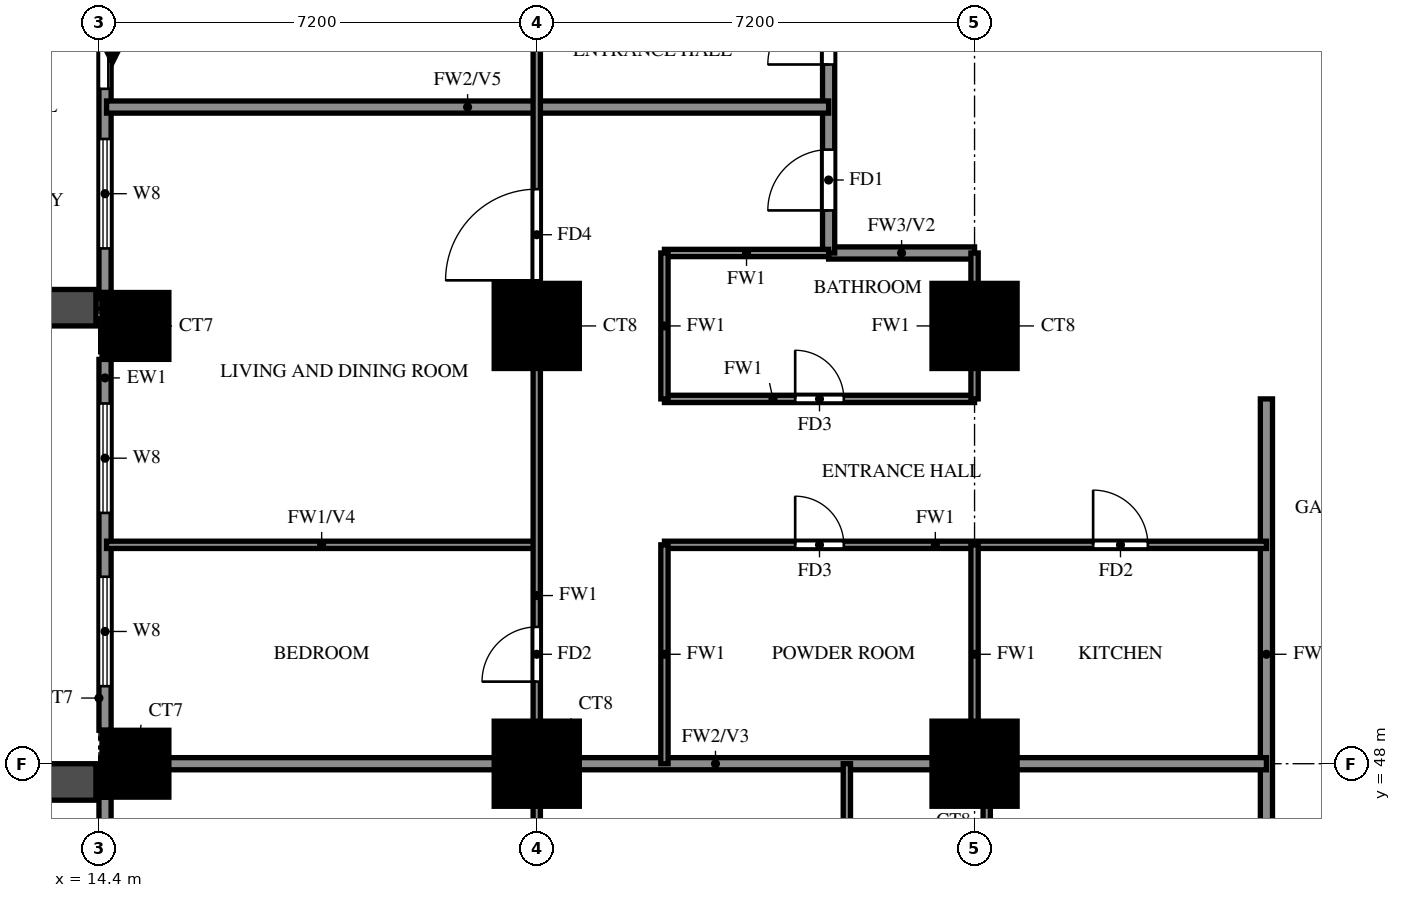
"""IFC4 building model, lengths in metres.
Left out: names, types, materials, properties, quantities, classifications, styles, units other than length and angle.
Written with IfcOpenShell. Run it as: python <this file> out.ifc"""

import sys

from ifc_helpers import new_model, si_unit, direction, frame, frame_2d, origin, origin_2d, place, context, subcontext, project, spatial, rectangle, extrude, source, transform, mapped, element, fill, save


model = new_model("IFC4")
c1 = context("Model", 3, precision=1e-05, world=origin(), true_north=direction((0.0, 1.0)))
c2 = subcontext(c1, "Body", "Model", "MODEL_VIEW")
j1 = project(units=[si_unit("LENGTHUNIT", "METRE"), si_unit("PLANEANGLEUNIT", "RADIAN")], contexts=[c1])
p1 = place(None, origin())
s1 = spatial("IfcSite", under=j1, at=p1, CompositionType="ELEMENT")
p2 = place(p1, origin())
s2 = spatial("IfcBuilding", under=s1, at=p2, CompositionType="ELEMENT")
p3 = place(p2, frame((0.0, 0.0, 48.0)))
s3 = spatial("IfcBuildingStorey", under=s2, at=p3, CompositionType="ELEMENT", Elevation=48.0)
m1 = source(origin(), c2, "Body", "SweptSolid", [
    extrude(rectangle(XDim=1.1, YDim=1.1, at=origin_2d()), origin(), (0.0, 0.0, 1.0), 3.18),
])
p4 = place(p3, frame((15.0, 48.0, 0.0), z_axis=(0.0, 0.0, 1.0), x_axis=(1.0, 0.0, 0.0)))
e1 = element("IfcColumn", 1, at=p4, inside=s3, PredefinedType="COLUMN", context=c2, shape_type="MappedRepresentation", body=[
    mapped(m1, transform((0.0, 0.0, 0.0))),
])
m2 = source(origin(), c2, "Body", "SweptSolid", [
    extrude(rectangle(XDim=1.4, YDim=1.4, at=origin_2d()), origin(), (0.0, 0.0, 1.0), 3.18),
])
for number, where, z_axis, x_axis in (
    (2, (21.6, 48.0, 0.0), (0.0, 0.0, 1.0), (1.0, 0.0, 0.0)),
    (3, (28.8, 48.0, 0.0), (0.0, 0.0, 1.0), (1.0, 0.0, 0.0)),
):
    element("IfcColumn", number, at=place(p3, frame(where, z_axis=z_axis, x_axis=x_axis)), inside=s3, PredefinedType="COLUMN", context=c2, shape_type="MappedRepresentation", body=[
        mapped(m2, transform((0.0, 0.0, 0.0))),
    ])
p5 = place(p3, frame((15.0, 55.2, 0.0), z_axis=(0.0, 0.0, 1.0), x_axis=(1.0, 0.0, 0.0)))
e4 = element("IfcColumn", 4, at=p5, inside=s3, PredefinedType="COLUMN", context=c2, shape_type="MappedRepresentation", body=[
    mapped(m1, transform((0.0, 0.0, 0.0))),
])
for number, where, z_axis, x_axis in (
    (5, (21.6, 55.2, 0.0), (0.0, 0.0, 1.0), (1.0, 0.0, 0.0)),
    (6, (28.8, 55.2, 0.0), (0.0, 0.0, 1.0), (1.0, 0.0, 0.0)),
):
    element("IfcColumn", number, at=place(p3, frame(where, z_axis=z_axis, x_axis=x_axis)), inside=s3, PredefinedType="COLUMN", context=c2, shape_type="MappedRepresentation", body=[
        mapped(m2, transform((0.0, 0.0, 0.0))),
    ])
p6 = place(p3, frame((14.5, 61.85, 0.0), z_axis=(0.0, 0.0, 1.0), x_axis=(0.0, -1.0, 0.0)))
e7 = element("IfcWall", 7, at=p6, inside=s3, PredefinedType="SOLIDWALL", context=c2, shape_type="SweptSolid", body=[
    extrude(rectangle(XDim=6.1, YDim=0.2, at=frame_2d((3.05, 0.0))), origin(), (0.0, 0.0, 1.0), 3.18),
])
p7 = place(p6, frame((0.95, 0.0, 0.0)))
e8 = element("IfcOpeningElement", 8, at=p7, cuts=e7, PredefinedType="OPENING", context=c2, shape_type="SweptSolid", body=[
    extrude(rectangle(XDim=1.8, YDim=2.4, at=frame_2d((0.9, 1.2))), frame((0.0, 0.11, 0.0), z_axis=(0.0, -1.0, 0.0), x_axis=(1.0, 0.0, 0.0)), (0.0, 0.0, 1.0), 0.22),
])
p8 = place(p6, frame((3.575, 0.0, 0.6)))
e9 = element("IfcOpeningElement", 9, at=p8, cuts=e7, PredefinedType="OPENING", context=c2, shape_type="SweptSolid", body=[
    extrude(rectangle(XDim=1.8, YDim=2.4, at=frame_2d((0.9, 1.2))), frame((0.0, 0.11, 0.0), z_axis=(0.0, -1.0, 0.0), x_axis=(1.0, 0.0, 0.0)), (0.0, 0.0, 1.0), 0.22),
])
p9 = place(p3, frame((14.5, 54.65, 0.0), z_axis=(0.0, 0.0, 1.0), x_axis=(0.0, -1.0, 0.0)))
e10 = element("IfcWall", 10, at=p9, inside=s3, PredefinedType="SOLIDWALL", context=c2, shape_type="SweptSolid", body=[
    extrude(rectangle(XDim=6.1, YDim=0.2, at=frame_2d((3.05, 0.0))), origin(), (0.0, 0.0, 1.0), 3.18),
])
p10 = place(p9, frame((3.575, 0.0, 0.6)))
e11 = element("IfcOpeningElement", 11, at=p10, cuts=e10, PredefinedType="OPENING", context=c2, shape_type="SweptSolid", body=[
    extrude(rectangle(XDim=1.8, YDim=2.4, at=frame_2d((0.9, 1.2))), frame((0.0, 0.11, 0.0), z_axis=(0.0, -1.0, 0.0), x_axis=(1.0, 0.0, 0.0)), (0.0, 0.0, 1.0), 0.22),
])
p11 = place(p9, frame((0.725, 0.0, 0.6)))
e12 = element("IfcOpeningElement", 12, at=p11, cuts=e10, PredefinedType="OPENING", context=c2, shape_type="SweptSolid", body=[
    extrude(rectangle(XDim=1.8, YDim=2.4, at=frame_2d((0.9, 1.2))), frame((0.0, 0.11, 0.0), z_axis=(0.0, -1.0, 0.0), x_axis=(1.0, 0.0, 0.0)), (0.0, 0.0, 1.0), 0.22),
])
p12 = place(p3, frame((14.5, 47.45, 0.0), z_axis=(0.0, 0.0, 1.0), x_axis=(0.0, -1.0, 0.0)))
e13 = element("IfcWall", 13, at=p12, inside=s3, PredefinedType="SOLIDWALL", context=c2, shape_type="SweptSolid", body=[
    extrude(rectangle(XDim=6.1, YDim=0.2, at=frame_2d((3.05, 0.0))), origin(), (0.0, 0.0, 1.0), 3.18),
])
p13 = place(p12, frame((2.15, 0.0, 0.0)))
e14 = element("IfcOpeningElement", 14, at=p13, cuts=e13, PredefinedType="OPENING", context=c2, shape_type="SweptSolid", body=[
    extrude(rectangle(XDim=1.8, YDim=2.4, at=frame_2d((0.9, 1.2))), frame((0.0, 0.11, 0.0), z_axis=(0.0, -1.0, 0.0), x_axis=(1.0, 0.0, 0.0)), (0.0, 0.0, 1.0), 0.22),
])
p14 = place(p12, frame((0.425, 0.0, 0.6)))
e15 = element("IfcOpeningElement", 15, at=p14, cuts=e13, PredefinedType="OPENING", context=c2, shape_type="SweptSolid", body=[
    extrude(rectangle(XDim=1.2, YDim=2.4, at=frame_2d((0.6, 1.2))), frame((0.0, 0.11, 0.0), z_axis=(0.0, -1.0, 0.0), x_axis=(1.0, 0.0, 0.0)), (0.0, 0.0, 1.0), 0.22),
])
p15 = place(p12, frame((4.475, 0.0, 0.6)))
e16 = element("IfcOpeningElement", 16, at=p15, cuts=e13, PredefinedType="OPENING", context=c2, shape_type="SweptSolid", body=[
    extrude(rectangle(XDim=1.2, YDim=2.4, at=frame_2d((0.6, 1.2))), frame((0.0, 0.11, 0.0), z_axis=(0.0, -1.0, 0.0), x_axis=(1.0, 0.0, 0.0)), (0.0, 0.0, 1.0), 0.22),
])
for number, where, z_axis, x_axis in (
    (17, (14.35, 55.5, 0.0), (0.0, 0.0, 1.0), (-1.0, 0.0, 0.0)),
    (18, (14.35, 47.7, 0.0), (0.0, 0.0, 1.0), (-1.0, 0.0, 0.0)),
):
    element("IfcWall", number, at=place(p3, frame(where, z_axis=z_axis, x_axis=x_axis)), inside=s3, PredefinedType="SOLIDWALL", context=c2, shape_type="SweptSolid", body=[
        extrude(rectangle(XDim=2.65, YDim=0.6, at=frame_2d((1.325, 0.0))), origin(), (0.0, 0.0, 1.0), 2.85),
    ])
p16 = place(p3, frame((26.4, 56.4, 0.0), z_axis=(0.0, 0.0, 1.0), x_axis=(1.0, 0.0, 0.0)))
e19 = element("IfcWall", 19, at=p16, inside=s3, PredefinedType="SOLIDWALL", context=c2, shape_type="SweptSolid", body=[
    extrude(rectangle(XDim=2.4, YDim=0.2, at=frame_2d((1.2, 0.0))), origin(), (0.0, 0.0, 1.0), 3.18),
])
p17 = place(p3, frame((26.4, 56.4, 0.0), z_axis=(0.0, 0.0, 1.0), x_axis=(0.0, 1.0, 0.0)))
e20 = element("IfcWall", 20, at=p17, inside=s3, PredefinedType="SOLIDWALL", context=c2, shape_type="SweptSolid", body=[
    extrude(rectangle(XDim=9.6, YDim=0.2, at=frame_2d((4.8, 0.0))), origin(), (0.0, 0.0, 1.0), 3.18),
])
p18 = place(p17, frame((0.7, 0.0, 0.0)))
e21 = element("IfcOpeningElement", 21, at=p18, cuts=e20, PredefinedType="OPENING", context=c2, shape_type="SweptSolid", body=[
    extrude(rectangle(XDim=1.0, YDim=2.1, at=frame_2d((0.5, 1.05))), frame((0.0, 0.11, 0.0), z_axis=(0.0, -1.0, 0.0), x_axis=(1.0, 0.0, 0.0)), (0.0, 0.0, 1.0), 0.22),
])
p19 = place(p17, frame((3.1, 0.0, 0.0)))
e22 = element("IfcOpeningElement", 22, at=p19, cuts=e20, PredefinedType="OPENING", context=c2, shape_type="SweptSolid", body=[
    extrude(rectangle(XDim=1.0, YDim=2.1, at=frame_2d((0.5, 1.05))), frame((0.0, 0.11, 0.0), z_axis=(0.0, -1.0, 0.0), x_axis=(1.0, 0.0, 0.0)), (0.0, 0.0, 1.0), 0.22),
])
p20 = place(p3, frame((33.6, 45.6, 0.0), z_axis=(0.0, 0.0, 1.0), x_axis=(0.0, 1.0, 0.0)))
e23 = element("IfcWall", 23, at=p20, inside=s3, PredefinedType="SOLIDWALL", context=c2, shape_type="SweptSolid", body=[
    extrude(rectangle(XDim=8.4, YDim=0.2, at=frame_2d((4.2, 0.0))), origin(), (0.0, 0.0, 1.0), 3.18),
])
p21 = place(p3, frame((14.525, 48.0, 0.0), z_axis=(0.0, 0.0, 1.0), x_axis=(1.0, 0.0, 0.0)))
e24 = element("IfcWall", 24, at=p21, inside=s3, PredefinedType="SOLIDWALL", context=c2, shape_type="SweptSolid", body=[
    extrude(rectangle(XDim=19.075, YDim=0.2, at=frame_2d((9.538, 0.0))), origin(), (0.0, 0.0, 1.0), 3.18),
])
p22 = place(p3, frame((14.525, 58.8, 0.0), z_axis=(0.0, 0.0, 1.0), x_axis=(1.0, 0.0, 0.0)))
e25 = element("IfcWall", 25, at=p22, inside=s3, PredefinedType="SOLIDWALL", context=c2, shape_type="SweptSolid", body=[
    extrude(rectangle(XDim=11.875, YDim=0.2, at=frame_2d((5.938, 0.0))), origin(), (0.0, 0.0, 1.0), 2.28),
])
p23 = place(p3, frame((14.525, 51.6, 0.0), z_axis=(0.0, 0.0, 1.0), x_axis=(1.0, 0.0, 0.0)))
e26 = element("IfcWall", 26, at=p23, inside=s3, PredefinedType="PARTITIONING", context=c2, shape_type="SweptSolid", body=[
    extrude(rectangle(XDim=7.075, YDim=0.12, at=frame_2d((3.538, 0.0))), origin(), (0.0, 0.0, 1.0), 2.28),
])
p24 = place(p3, frame((23.7, 51.6, 0.0), z_axis=(0.0, 0.0, 1.0), x_axis=(1.0, 0.0, 0.0)))
e27 = element("IfcWall", 27, at=p24, inside=s3, PredefinedType="PARTITIONING", context=c2, shape_type="SweptSolid", body=[
    extrude(rectangle(XDim=9.9, YDim=0.12, at=frame_2d((4.95, 0.0))), origin(), (0.0, 0.0, 1.0), 3.18),
])
p25 = place(p24, frame((2.15, 0.0, 0.0)))
e28 = element("IfcOpeningElement", 28, at=p25, cuts=e27, PredefinedType="OPENING", context=c2, shape_type="SweptSolid", body=[
    extrude(rectangle(XDim=0.8, YDim=2.1, at=frame_2d((0.4, 1.05))), frame((0.0, 0.07, 0.0), z_axis=(0.0, -1.0, 0.0), x_axis=(1.0, 0.0, 0.0)), (0.0, 0.0, 1.0), 0.14),
])
p26 = place(p24, frame((7.05, 0.0, 0.0)))
e29 = element("IfcOpeningElement", 29, at=p26, cuts=e27, PredefinedType="OPENING", context=c2, shape_type="SweptSolid", body=[
    extrude(rectangle(XDim=0.9, YDim=2.1, at=frame_2d((0.45, 1.05))), frame((0.0, 0.07, 0.0), z_axis=(0.0, -1.0, 0.0), x_axis=(1.0, 0.0, 0.0)), (0.0, 0.0, 1.0), 0.14),
])
p27 = place(p3, frame((23.7, 54.0, 0.0), z_axis=(0.0, 0.0, 1.0), x_axis=(1.0, 0.0, 0.0)))
e30 = element("IfcWall", 30, at=p27, inside=s3, PredefinedType="PARTITIONING", context=c2, shape_type="SweptSolid", body=[
    extrude(rectangle(XDim=5.1, YDim=0.12, at=frame_2d((2.55, 0.0))), origin(), (0.0, 0.0, 1.0), 3.18),
])
p28 = place(p27, frame((2.15, 0.0, 0.0)))
e31 = element("IfcOpeningElement", 31, at=p28, cuts=e30, PredefinedType="OPENING", context=c2, shape_type="SweptSolid", body=[
    extrude(rectangle(XDim=0.8, YDim=2.1, at=frame_2d((0.4, 1.05))), frame((0.0, 0.07, 0.0), z_axis=(0.0, -1.0, 0.0), x_axis=(1.0, 0.0, 0.0)), (0.0, 0.0, 1.0), 0.14),
])
p29 = place(p3, frame((23.7, 56.4, 0.0), z_axis=(0.0, 0.0, 1.0), x_axis=(1.0, 0.0, 0.0)))
e32 = element("IfcWall", 32, at=p29, inside=s3, PredefinedType="PARTITIONING", context=c2, shape_type="SweptSolid", body=[
    extrude(rectangle(XDim=2.7, YDim=0.12, at=frame_2d((1.35, 0.0))), origin(), (0.0, 0.0, 1.0), 3.18),
])
p30 = place(p3, frame((21.6, 33.725, 0.0), z_axis=(0.0, 0.0, 1.0), x_axis=(0.0, 1.0, 0.0)))
e33 = element("IfcWall", 33, at=p30, inside=s3, PredefinedType="PARTITIONING", context=c2, shape_type="SweptSolid", body=[
    extrude(rectangle(XDim=35.875, YDim=0.12, at=frame_2d((17.938, 0.0))), origin(), (0.0, 0.0, 1.0), 3.18),
])
p31 = place(p30, frame((7.775, 0.0, 0.0)))
e34 = element("IfcOpeningElement", 34, at=p31, cuts=e33, PredefinedType="OPENING", context=c2, shape_type="SweptSolid", body=[
    extrude(rectangle(XDim=0.9, YDim=2.1, at=frame_2d((0.45, 1.05))), frame((0.0, 0.07, 0.0), z_axis=(0.0, -1.0, 0.0), x_axis=(1.0, 0.0, 0.0)), (0.0, 0.0, 1.0), 0.14),
])
p32 = place(p30, frame((15.625, 0.0, 0.0)))
e35 = element("IfcOpeningElement", 35, at=p32, cuts=e33, PredefinedType="OPENING", context=c2, shape_type="SweptSolid", body=[
    extrude(rectangle(XDim=0.9, YDim=2.1, at=frame_2d((0.45, 1.05))), frame((0.0, 0.07, 0.0), z_axis=(0.0, -1.0, 0.0), x_axis=(1.0, 0.0, 0.0)), (0.0, 0.0, 1.0), 0.14),
])
p33 = place(p30, frame((22.225, 0.0, 0.0)))
e36 = element("IfcOpeningElement", 36, at=p33, cuts=e33, PredefinedType="OPENING", context=c2, shape_type="SweptSolid", body=[
    extrude(rectangle(XDim=1.5, YDim=2.1, at=frame_2d((0.75, 1.05))), frame((0.0, 0.07, 0.0), z_axis=(0.0, -1.0, 0.0), x_axis=(1.0, 0.0, 0.0)), (0.0, 0.0, 1.0), 0.14),
])
p34 = place(p30, frame((26.425, 0.0, 0.0)))
e37 = element("IfcOpeningElement", 37, at=p34, cuts=e33, PredefinedType="OPENING", context=c2, shape_type="SweptSolid", body=[
    extrude(rectangle(XDim=0.9, YDim=2.1, at=frame_2d((0.45, 1.05))), frame((0.0, 0.07, 0.0), z_axis=(0.0, -1.0, 0.0), x_axis=(1.0, 0.0, 0.0)), (0.0, 0.0, 1.0), 0.14),
])
p35 = place(p30, frame((31.825, 0.0, 0.0)))
e38 = element("IfcOpeningElement", 38, at=p35, cuts=e33, PredefinedType="OPENING", context=c2, shape_type="SweptSolid", body=[
    extrude(rectangle(XDim=0.9, YDim=2.1, at=frame_2d((0.45, 1.05))), frame((0.0, 0.07, 0.0), z_axis=(0.0, -1.0, 0.0), x_axis=(1.0, 0.0, 0.0)), (0.0, 0.0, 1.0), 0.14),
])
p36 = place(p3, frame((23.7, 48.0, 0.0), z_axis=(0.0, 0.0, 1.0), x_axis=(0.0, 1.0, 0.0)))
e39 = element("IfcWall", 39, at=p36, inside=s3, PredefinedType="PARTITIONING", context=c2, shape_type="SweptSolid", body=[
    extrude(rectangle(XDim=3.6, YDim=0.12, at=frame_2d((1.8, 0.0))), origin(), (0.0, 0.0, 1.0), 3.18),
])
p37 = place(p3, frame((23.7, 54.0, 0.0), z_axis=(0.0, 0.0, 1.0), x_axis=(0.0, 1.0, 0.0)))
e40 = element("IfcWall", 40, at=p37, inside=s3, PredefinedType="PARTITIONING", context=c2, shape_type="SweptSolid", body=[
    extrude(rectangle(XDim=2.4, YDim=0.12, at=frame_2d((1.2, 0.0))), origin(), (0.0, 0.0, 1.0), 3.18),
])
p38 = place(p3, frame((26.7, 42.9, 0.0), z_axis=(0.0, 0.0, 1.0), x_axis=(0.0, 1.0, 0.0)))
e41 = element("IfcWall", 41, at=p38, inside=s3, PredefinedType="PARTITIONING", context=c2, shape_type="SweptSolid", body=[
    extrude(rectangle(XDim=5.1, YDim=0.12, at=frame_2d((2.55, 0.0))), origin(), (0.0, 0.0, 1.0), 3.18),
])
p39 = place(p3, frame((28.8, 48.0, 0.0), z_axis=(0.0, 0.0, 1.0), x_axis=(0.0, 1.0, 0.0)))
e42 = element("IfcWall", 42, at=p39, inside=s3, PredefinedType="PARTITIONING", context=c2, shape_type="SweptSolid", body=[
    extrude(rectangle(XDim=3.6, YDim=0.12, at=frame_2d((1.8, 0.0))), origin(), (0.0, 0.0, 1.0), 3.18),
])
p40 = place(p3, frame((28.8, 54.0, 0.0), z_axis=(0.0, 0.0, 1.0), x_axis=(0.0, 1.0, 0.0)))
e43 = element("IfcWall", 43, at=p40, inside=s3, PredefinedType="PARTITIONING", context=c2, shape_type="SweptSolid", body=[
    extrude(rectangle(XDim=2.4, YDim=0.12, at=frame_2d((1.2, 0.0))), origin(), (0.0, 0.0, 1.0), 3.18),
])
p41 = place(p3, frame((29.0, 42.9, 0.0), z_axis=(0.0, 0.0, 1.0), x_axis=(0.0, 1.0, 0.0)))
e44 = element("IfcWall", 44, at=p41, inside=s3, PredefinedType="PARTITIONING", context=c2, shape_type="SweptSolid", body=[
    extrude(rectangle(XDim=5.1, YDim=0.12, at=frame_2d((2.55, 0.0))), origin(), (0.0, 0.0, 1.0), 3.18),
])
p42 = place(p7, origin())
e45 = element("IfcDoor", 45, at=p42, inside=s3, OperationType="DOUBLE_DOOR_SLIDING", PredefinedType="DOOR", context=c2, shape_type="SweptSolid", body=[
    extrude(rectangle(XDim=1.8, YDim=2.4, at=frame_2d((0.9, 1.2))), frame((0.0, 0.025, 0.0), z_axis=(0.0, -1.0, 0.0), x_axis=(1.0, 0.0, 0.0)), (0.0, 0.0, 1.0), 0.05),
])
fill(e8, e45)
p43 = place(p8, origin())
e46 = element("IfcWindow", 46, at=p43, inside=s3, PartitioningType="DOUBLE_PANEL_VERTICAL", PredefinedType="WINDOW", context=c2, shape_type="SweptSolid", body=[
    extrude(rectangle(XDim=1.8, YDim=2.4, at=frame_2d((0.9, 1.2))), frame((0.0, 0.03, 0.0), z_axis=(0.0, -1.0, 0.0), x_axis=(1.0, 0.0, 0.0)), (0.0, 0.0, 1.0), 0.06),
])
fill(e9, e46)
p44 = place(p10, origin())
e47 = element("IfcWindow", 47, at=p44, inside=s3, PartitioningType="DOUBLE_PANEL_VERTICAL", PredefinedType="WINDOW", context=c2, shape_type="SweptSolid", body=[
    extrude(rectangle(XDim=1.8, YDim=2.4, at=frame_2d((0.9, 1.2))), frame((0.0, 0.03, 0.0), z_axis=(0.0, -1.0, 0.0), x_axis=(1.0, 0.0, 0.0)), (0.0, 0.0, 1.0), 0.06),
])
fill(e11, e47)
p45 = place(p11, origin())
e48 = element("IfcWindow", 48, at=p45, inside=s3, PartitioningType="DOUBLE_PANEL_VERTICAL", PredefinedType="WINDOW", context=c2, shape_type="SweptSolid", body=[
    extrude(rectangle(XDim=1.8, YDim=2.4, at=frame_2d((0.9, 1.2))), frame((0.0, 0.03, 0.0), z_axis=(0.0, -1.0, 0.0), x_axis=(1.0, 0.0, 0.0)), (0.0, 0.0, 1.0), 0.06),
])
fill(e12, e48)
p46 = place(p18, origin())
e49 = element("IfcDoor", 49, at=p46, inside=s3, OperationType="SINGLE_SWING_LEFT", PredefinedType="DOOR", context=c2, shape_type="SweptSolid", body=[
    extrude(rectangle(XDim=1.0, YDim=2.1, at=frame_2d((0.5, 1.05))), frame((0.0, 0.025, 0.0), z_axis=(0.0, -1.0, 0.0), x_axis=(1.0, 0.0, 0.0)), (0.0, 0.0, 1.0), 0.05),
])
fill(e21, e49)
p47 = place(p32, origin())
e50 = element("IfcDoor", 50, at=p47, inside=s3, OperationType="SINGLE_SWING_RIGHT", PredefinedType="DOOR", context=c2, shape_type="SweptSolid", body=[
    extrude(rectangle(XDim=0.9, YDim=2.1, at=frame_2d((0.45, 1.05))), frame((0.0, 0.025, 0.0), z_axis=(0.0, -1.0, 0.0), x_axis=(1.0, 0.0, 0.0)), (0.0, 0.0, 1.0), 0.05),
])
fill(e35, e50)
p48 = place(p33, origin())
e51 = element("IfcDoor", 51, at=p48, inside=s3, OperationType="SINGLE_SWING_RIGHT", PredefinedType="DOOR", context=c2, shape_type="SweptSolid", body=[
    extrude(rectangle(XDim=1.5, YDim=2.1, at=frame_2d((0.75, 1.05))), frame((0.0, 0.025, 0.0), z_axis=(0.0, -1.0, 0.0), x_axis=(1.0, 0.0, 0.0)), (0.0, 0.0, 1.0), 0.05),
])
fill(e36, e51)
p49 = place(p25, origin())
e52 = element("IfcDoor", 52, at=p49, inside=s3, OperationType="SINGLE_SWING_LEFT", PredefinedType="DOOR", context=c2, shape_type="SweptSolid", body=[
    extrude(rectangle(XDim=0.8, YDim=2.1, at=frame_2d((0.4, 1.05))), frame((0.0, 0.025, 0.0), z_axis=(0.0, -1.0, 0.0), x_axis=(1.0, 0.0, 0.0)), (0.0, 0.0, 1.0), 0.05),
])
fill(e28, e52)
p50 = place(p28, origin())
e53 = element("IfcDoor", 53, at=p50, inside=s3, OperationType="SINGLE_SWING_RIGHT", PredefinedType="DOOR", context=c2, shape_type="SweptSolid", body=[
    extrude(rectangle(XDim=0.8, YDim=2.1, at=frame_2d((0.4, 1.05))), frame((0.0, 0.025, 0.0), z_axis=(0.0, -1.0, 0.0), x_axis=(1.0, 0.0, 0.0)), (0.0, 0.0, 1.0), 0.05),
])
fill(e31, e53)
p51 = place(p26, origin())
e54 = element("IfcDoor", 54, at=p51, inside=s3, OperationType="SINGLE_SWING_LEFT", PredefinedType="DOOR", context=c2, shape_type="SweptSolid", body=[
    extrude(rectangle(XDim=0.9, YDim=2.1, at=frame_2d((0.45, 1.05))), frame((0.0, 0.025, 0.0), z_axis=(0.0, -1.0, 0.0), x_axis=(1.0, 0.0, 0.0)), (0.0, 0.0, 1.0), 0.05),
])
fill(e29, e54)
p52 = place(p19, origin())
e55 = element("IfcDoor", 55, at=p52, inside=s3, OperationType="SINGLE_SWING_LEFT", PredefinedType="DOOR", context=c2, shape_type="SweptSolid", body=[
    extrude(rectangle(XDim=1.0, YDim=2.1, at=frame_2d((0.5, 1.05))), frame((0.0, 0.025, 0.0), z_axis=(0.0, -1.0, 0.0), x_axis=(1.0, 0.0, 0.0)), (0.0, 0.0, 1.0), 0.05),
])
fill(e22, e55)
save(model, sys.argv[1])
